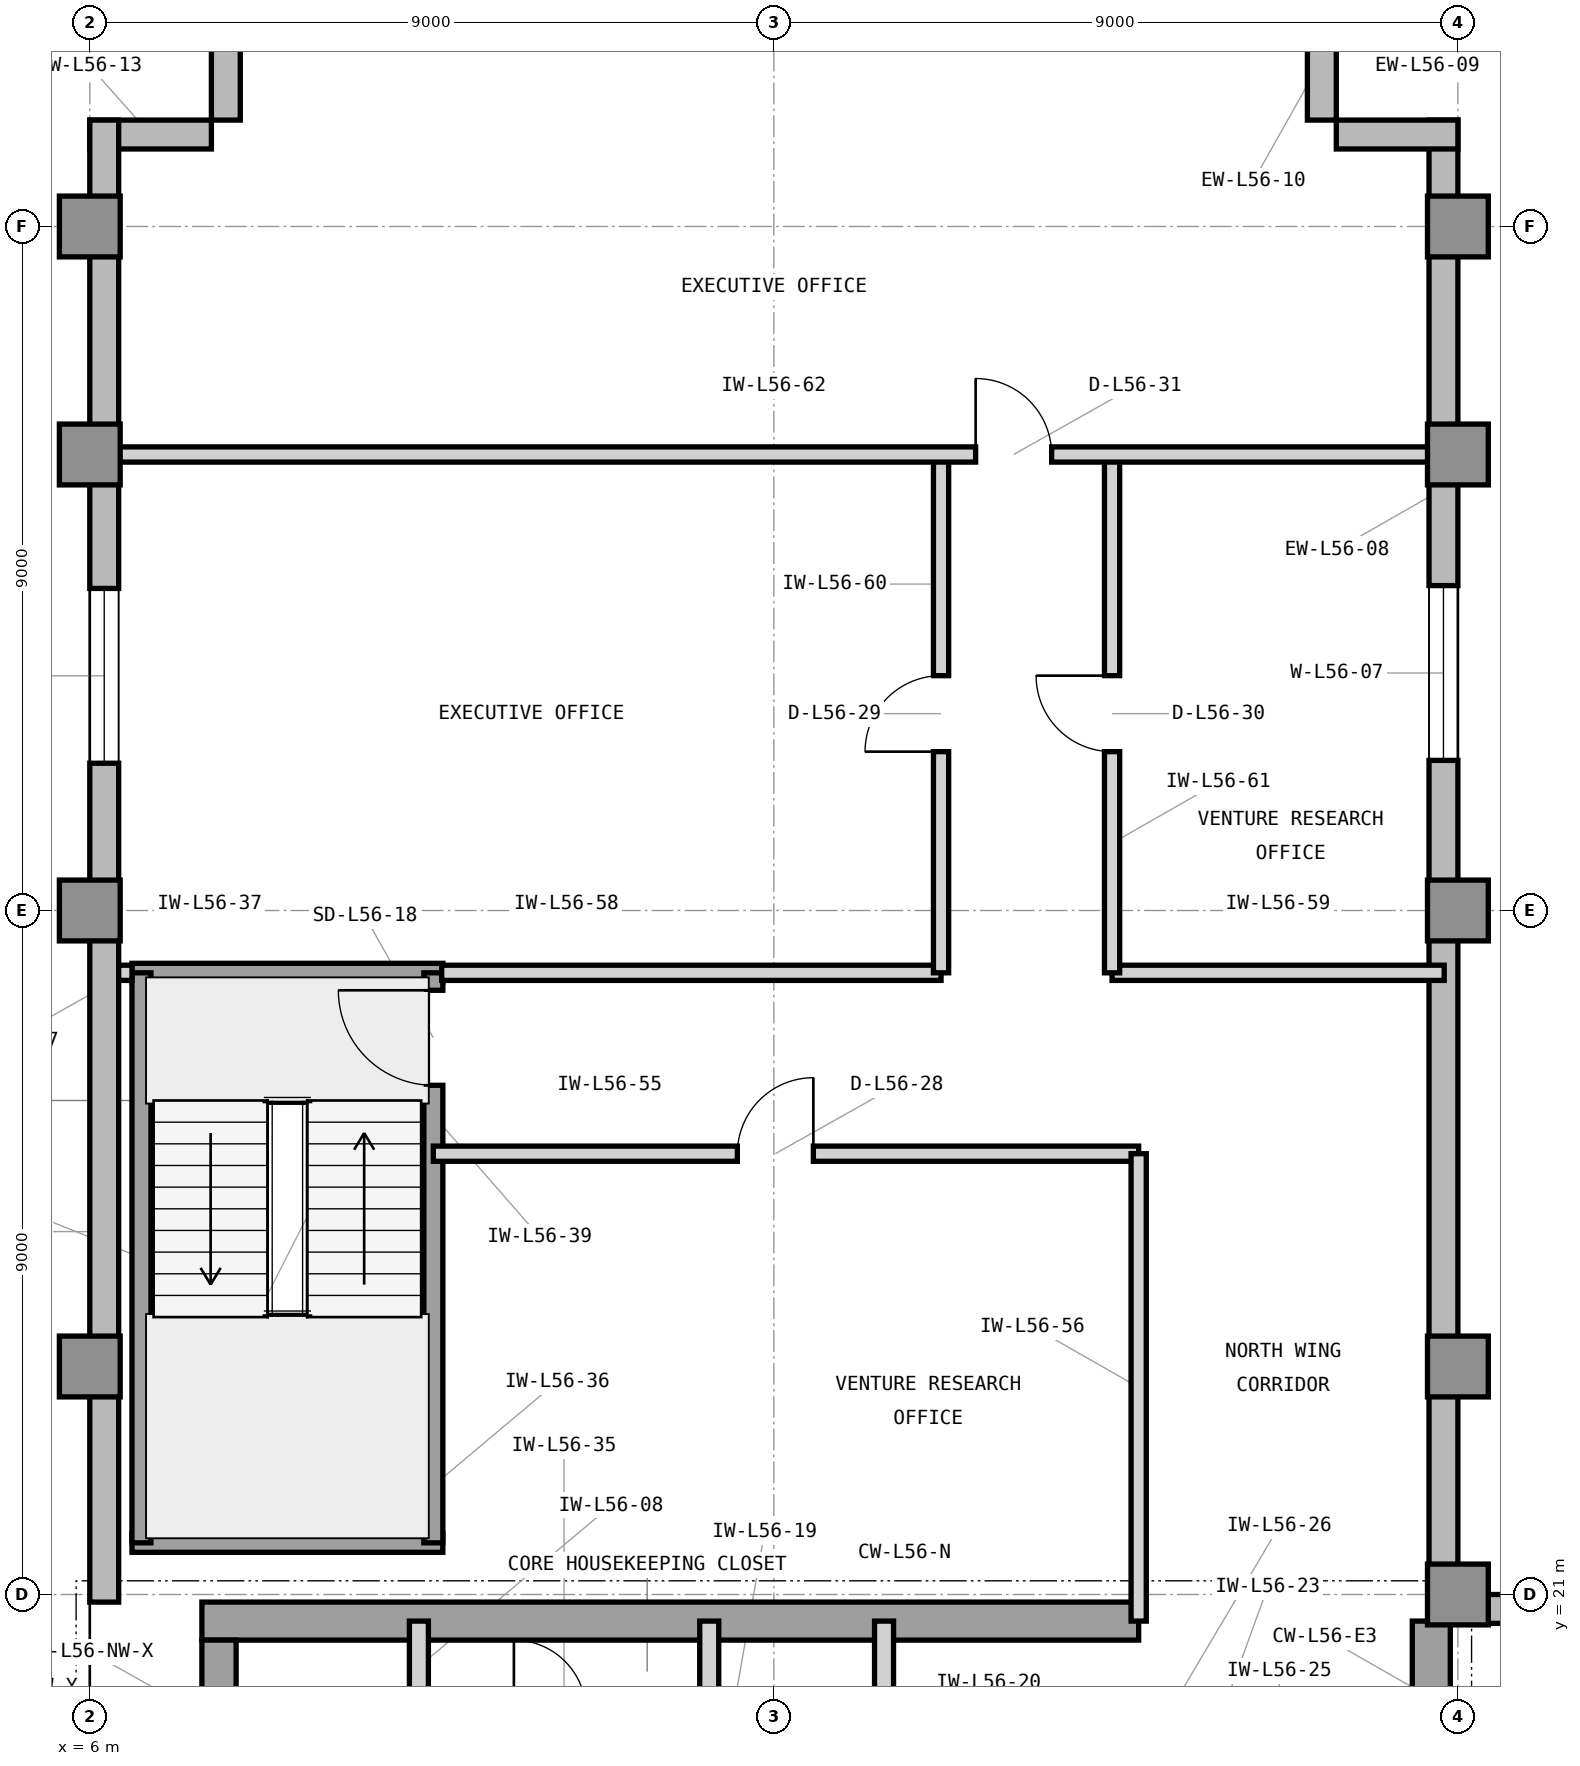
"""IFC4 building model, lengths in metres.
Left out: names, types, materials, properties, quantities, classifications, styles, units other than length and angle.
Written with IfcOpenShell. Run it as: python <this file> out.ifc"""

import sys

from ifc_helpers import new_model, si_unit, direction, frame, frame_2d, origin, origin_2d, place, context, subcontext, project, spatial, rectangle, extrude, element, fill, save


model = new_model("IFC4")
c1 = context("Model", 3, precision=1e-05, world=origin(), true_north=direction((0.0, 1.0)))
c2 = subcontext(c1, "Body", "Model", "MODEL_VIEW")
j1 = project(units=[si_unit("LENGTHUNIT", "METRE"), si_unit("PLANEANGLEUNIT", "RADIAN")], contexts=[c1])
p1 = place(None, origin())
s1 = spatial("IfcSite", under=j1, at=p1, CompositionType="ELEMENT")
p2 = place(p1, origin())
s2 = spatial("IfcBuilding", under=s1, at=p2, CompositionType="ELEMENT")
p3 = place(p2, frame((0.0, 0.0, 231.3)))
s3 = spatial("IfcBuildingStorey", under=s2, at=p3, CompositionType="ELEMENT", Elevation=231.3)
p4 = place(p3, frame((7.475, 20.65, 0.0), z_axis=(0.0, 0.0, 1.0), x_axis=(1.0, 0.0, 0.0)))
e1 = element("IfcWall", 1, at=p4, inside=s3, PredefinedType="SHEAR", context=c2, shape_type="SweptSolid", body=[
    extrude(rectangle(XDim=12.325, YDim=0.5, at=frame_2d((6.163, 0.0))), origin(), (0.0, 0.0, 1.0), 3.9),
])
p5 = place(p3, frame((23.65, 16.6, 0.0), z_axis=(0.0, 0.0, 1.0), x_axis=(0.0, 1.0, 0.0)))
e2 = element("IfcWall", 2, at=p5, inside=s3, PredefinedType="SHEAR", context=c2, shape_type="SweptSolid", body=[
    extrude(rectangle(XDim=4.05, YDim=0.5, at=frame_2d((2.025, 0.0))), origin(), (0.0, 0.0, 1.0), 3.9),
])
p6 = place(p3, frame((7.7, 19.575, 0.0), z_axis=(0.0, 0.0, 1.0), x_axis=(0.0, 1.0, 0.0)))
e3 = element("IfcWall", 3, at=p6, inside=s3, PredefinedType="SHEAR", context=c2, shape_type="SweptSolid", body=[
    extrude(rectangle(XDim=0.825, YDim=0.45, at=frame_2d((0.413, 0.0))), origin(), (0.0, 0.0, 1.0), 3.9),
])
for number, where, z_axis, x_axis in (
    (4, (24.0, 21.0, 0.0), (0.0, 0.0, 1.0), (1.0, 0.0, 0.0)),
    (5, (6.0, 24.0, 0.0), (0.0, 0.0, 1.0), (1.0, 0.0, 0.0)),
    (6, (24.0, 24.0, 0.0), (0.0, 0.0, 1.0), (1.0, 0.0, 0.0)),
    (7, (6.0, 30.0, 0.0), (0.0, 0.0, 1.0), (1.0, 0.0, 0.0)),
    (8, (24.0, 30.0, 0.0), (0.0, 0.0, 1.0), (1.0, 0.0, 0.0)),
    (9, (6.0, 36.0, 0.0), (0.0, 0.0, 1.0), (1.0, 0.0, 0.0)),
    (10, (24.0, 36.0, 0.0), (0.0, 0.0, 1.0), (1.0, 0.0, 0.0)),
    (11, (6.0, 39.0, 0.0), (0.0, 0.0, 1.0), (1.0, 0.0, 0.0)),
    (12, (24.0, 39.0, 0.0), (0.0, 0.0, 1.0), (1.0, 0.0, 0.0)),
):
    element("IfcColumn", number, at=place(p3, frame(where, z_axis=z_axis, x_axis=x_axis)), inside=s3, PredefinedType="COLUMN", context=c2, shape_type="SweptSolid", body=[
        extrude(rectangle(XDim=0.8, YDim=0.8, at=origin_2d()), origin(), (0.0, 0.0, 1.0), 3.9),
    ])
p7 = place(p3, frame((52.4, 20.81, 0.0), z_axis=(0.0, 0.0, 1.0), x_axis=(-1.0, 0.0, 0.0)))
e13 = element("IfcWall", 13, at=p7, inside=s3, PredefinedType="STANDARD", context=c2, shape_type="SweptSolid", body=[
    extrude(rectangle(XDim=28.4, YDim=0.38, at=frame_2d((14.2, 0.0))), origin(), (0.0, 0.0, 1.0), 3.7),
])
p8 = place(p7, frame((5.95, 0.0, 0.9)))
e14 = element("IfcOpeningElement", 14, at=p8, cuts=e13, PredefinedType="OPENING", context=c2, shape_type="SweptSolid", body=[
    extrude(rectangle(XDim=2.3, YDim=2.2, at=frame_2d((1.15, 1.1))), frame((0.0, 0.2, 0.0), z_axis=(0.0, -1.0, 0.0), x_axis=(1.0, 0.0, 0.0)), (0.0, 0.0, 1.0), 0.4),
])
p9 = place(p7, frame((15.417, 0.0, 0.9)))
e15 = element("IfcOpeningElement", 15, at=p9, cuts=e13, PredefinedType="OPENING", context=c2, shape_type="SweptSolid", body=[
    extrude(rectangle(XDim=2.3, YDim=2.2, at=frame_2d((1.15, 1.1))), frame((0.0, 0.2, 0.0), z_axis=(0.0, -1.0, 0.0), x_axis=(1.0, 0.0, 0.0)), (0.0, 0.0, 1.0), 0.4),
])
p10 = place(p7, frame((26.084, 0.0, 0.9)))
e16 = element("IfcOpeningElement", 16, at=p10, cuts=e13, PredefinedType="OPENING", context=c2, shape_type="SweptSolid", body=[
    extrude(rectangle(XDim=1.6, YDim=2.2, at=frame_2d((0.8, 1.1))), frame((0.0, 0.2, 0.0), z_axis=(0.0, -1.0, 0.0), x_axis=(1.0, 0.0, 0.0)), (0.0, 0.0, 1.0), 0.4),
])
p11 = place(p3, frame((23.81, 21.0, 0.0), z_axis=(0.0, 0.0, 1.0), x_axis=(0.0, 1.0, 0.0)))
e17 = element("IfcWall", 17, at=p11, inside=s3, PredefinedType="STANDARD", context=c2, shape_type="SweptSolid", body=[
    extrude(rectangle(XDim=19.4, YDim=0.38, at=frame_2d((9.7, 0.0))), origin(), (0.0, 0.0, 1.0), 3.7),
])
p12 = place(p11, frame((10.975, 0.0, 0.9)))
e18 = element("IfcOpeningElement", 18, at=p12, cuts=e17, PredefinedType="OPENING", context=c2, shape_type="SweptSolid", body=[
    extrude(rectangle(XDim=2.3, YDim=2.2, at=frame_2d((1.15, 1.1))), frame((0.0, 0.2, 0.0), z_axis=(0.0, -1.0, 0.0), x_axis=(1.0, 0.0, 0.0)), (0.0, 0.0, 1.0), 0.4),
])
for number, where, z_axis, x_axis in (
    (19, (24.0, 40.21, 0.0), (0.0, 0.0, 1.0), (-1.0, 0.0, 0.0)),
    (20, (22.21, 40.4, 0.0), (0.0, 0.0, 1.0), (0.0, 1.0, 0.0)),
    (21, (7.79, 42.0, 0.0), (0.0, 0.0, 1.0), (0.0, -1.0, 0.0)),
    (22, (7.6, 40.21, 0.0), (0.0, 0.0, 1.0), (-1.0, 0.0, 0.0)),
):
    element("IfcWall", number, at=place(p3, frame(where, z_axis=z_axis, x_axis=x_axis)), inside=s3, PredefinedType="STANDARD", context=c2, shape_type="SweptSolid", body=[
        extrude(rectangle(XDim=1.6, YDim=0.38, at=frame_2d((0.8, 0.0))), origin(), (0.0, 0.0, 1.0), 3.7),
    ])
p13 = place(p3, frame((6.19, 40.4, 0.0), z_axis=(0.0, 0.0, 1.0), x_axis=(0.0, -1.0, 0.0)))
e23 = element("IfcWall", 23, at=p13, inside=s3, PredefinedType="STANDARD", context=c2, shape_type="SweptSolid", body=[
    extrude(rectangle(XDim=19.5, YDim=0.38, at=frame_2d((9.75, 0.0))), origin(), (0.0, 0.0, 1.0), 3.7),
])
p14 = place(p13, frame((6.163, 0.0, 0.9)))
e24 = element("IfcOpeningElement", 24, at=p14, cuts=e23, PredefinedType="OPENING", context=c2, shape_type="SweptSolid", body=[
    extrude(rectangle(XDim=2.3, YDim=2.2, at=frame_2d((1.15, 1.1))), frame((0.0, 0.2, 0.0), z_axis=(0.0, -1.0, 0.0), x_axis=(1.0, 0.0, 0.0)), (0.0, 0.0, 1.0), 0.4),
])
p15 = place(p3, frame((10.33, 19.45, 0.0), z_axis=(0.0, 0.0, 1.0), x_axis=(0.0, 1.0, 0.0)))
e25 = element("IfcWall", 25, at=p15, inside=s3, PredefinedType="PARTITIONING", context=c2, shape_type="SweptSolid", body=[
    extrude(rectangle(XDim=1.2, YDim=0.25, at=frame_2d((0.6, 0.0))), origin(), (0.0, 0.0, 1.0), 3.69),
])
for number, where, z_axis, x_axis in (
    (26, (14.15, 16.7, 0.0), (0.0, 0.0, 1.0), (0.0, 1.0, 0.0)),
    (27, (16.45, 16.7, 0.0), (0.0, 0.0, 1.0), (0.0, 1.0, 0.0)),
):
    element("IfcWall", number, at=place(p3, frame(where, z_axis=z_axis, x_axis=x_axis)), inside=s3, PredefinedType="PARTITIONING", context=c2, shape_type="SweptSolid", body=[
        extrude(rectangle(XDim=3.95, YDim=0.25, at=frame_2d((1.975, 0.0))), origin(), (0.0, 0.0, 1.0), 3.69),
    ])
for number, where, z_axis, x_axis in (
    (28, (6.555, 21.68, 0.0), (0.0, 0.0, 1.0), (1.0, 0.0, 0.0)),
    (29, (6.555, 29.18, 0.0), (0.0, 0.0, 1.0), (1.0, 0.0, 0.0)),
):
    element("IfcWall", number, at=place(p3, frame(where, z_axis=z_axis, x_axis=x_axis)), inside=s3, PredefinedType="SHEAR", context=c2, shape_type="SweptSolid", body=[
        extrude(rectangle(XDim=4.09, YDim=0.25, at=frame_2d((2.045, 0.0))), origin(), (0.0, 0.0, 1.0), 3.9),
    ])
p16 = place(p3, frame((6.68, 21.68, 0.0), z_axis=(0.0, 0.0, 1.0), x_axis=(0.0, 1.0, 0.0)))
e30 = element("IfcWall", 30, at=p16, inside=s3, PredefinedType="SHEAR", context=c2, shape_type="SweptSolid", body=[
    extrude(rectangle(XDim=7.5, YDim=0.25, at=frame_2d((3.75, 0.0))), origin(), (0.0, 0.0, 1.0), 3.9),
])
p17 = place(p3, frame((10.52, 21.68, 0.0), z_axis=(0.0, 0.0, 1.0), x_axis=(0.0, 1.0, 0.0)))
e31 = element("IfcWall", 31, at=p17, inside=s3, PredefinedType="SHEAR", context=c2, shape_type="SweptSolid", body=[
    extrude(rectangle(XDim=7.5, YDim=0.25, at=frame_2d((3.75, 0.0))), origin(), (0.0, 0.0, 1.0), 3.9),
])
p18 = place(p17, frame((6.02, 0.0, 0.0)))
e32 = element("IfcOpeningElement", 32, at=p18, cuts=e31, PredefinedType="OPENING", context=c2, shape_type="SweptSolid", body=[
    extrude(rectangle(XDim=1.25, YDim=2.2, at=frame_2d((0.625, 1.1))), frame((0.0, 0.135, 0.0), z_axis=(0.0, -1.0, 0.0), x_axis=(1.0, 0.0, 0.0)), (0.0, 0.0, 1.0), 0.27),
])
p19 = place(p3, frame((10.52, 26.8, 0.0), z_axis=(0.0, 0.0, 1.0), x_axis=(1.0, 0.0, 0.0)))
e33 = element("IfcWall", 33, at=p19, inside=s3, PredefinedType="PARTITIONING", context=c2, shape_type="SweptSolid", body=[
    extrude(rectangle(XDim=9.28, YDim=0.2, at=frame_2d((4.64, 0.0))), origin(), (0.0, 0.0, 1.0), 3.69),
])
p20 = place(p19, frame((4.0, 0.0, 0.0)))
e34 = element("IfcOpeningElement", 34, at=p20, cuts=e33, PredefinedType="OPENING", context=c2, shape_type="SweptSolid", body=[
    extrude(rectangle(XDim=1.0, YDim=2.15, at=frame_2d((0.5, 1.075))), frame((0.0, 0.11, 0.0), z_axis=(0.0, -1.0, 0.0), x_axis=(1.0, 0.0, 0.0)), (0.0, 0.0, 1.0), 0.22),
])
p21 = place(p3, frame((19.8, 20.65, 0.0), z_axis=(0.0, 0.0, 1.0), x_axis=(0.0, 1.0, 0.0)))
e35 = element("IfcWall", 35, at=p21, inside=s3, PredefinedType="PARTITIONING", context=c2, shape_type="SweptSolid", body=[
    extrude(rectangle(XDim=6.15, YDim=0.2, at=frame_2d((3.075, 0.0))), origin(), (0.0, 0.0, 1.0), 3.69),
])
p22 = place(p3, frame((6.38, 29.18, 0.0), z_axis=(0.0, 0.0, 1.0), x_axis=(1.0, 0.0, 0.0)))
e36 = element("IfcWall", 36, at=p22, inside=s3, PredefinedType="PARTITIONING", context=c2, shape_type="SweptSolid", body=[
    extrude(rectangle(XDim=0.175, YDim=0.2, at=frame_2d((0.087, 0.0))), origin(), (0.0, 0.0, 1.0), 3.69),
])
p23 = place(p3, frame((10.63, 29.18, 0.0), z_axis=(0.0, 0.0, 1.0), x_axis=(1.0, 0.0, 0.0)))
e37 = element("IfcWall", 37, at=p23, inside=s3, PredefinedType="PARTITIONING", context=c2, shape_type="SweptSolid", body=[
    extrude(rectangle(XDim=6.57, YDim=0.2, at=frame_2d((3.285, 0.0))), origin(), (0.0, 0.0, 1.0), 3.69),
])
p24 = place(p3, frame((19.45, 29.18, 0.0), z_axis=(0.0, 0.0, 1.0), x_axis=(1.0, 0.0, 0.0)))
e38 = element("IfcWall", 38, at=p24, inside=s3, PredefinedType="PARTITIONING", context=c2, shape_type="SweptSolid", body=[
    extrude(rectangle(XDim=4.37, YDim=0.2, at=frame_2d((2.185, 0.0))), origin(), (0.0, 0.0, 1.0), 3.69),
])
p25 = place(p3, frame((17.2, 29.18, 0.0), z_axis=(0.0, 0.0, 1.0), x_axis=(0.0, 1.0, 0.0)))
e39 = element("IfcWall", 39, at=p25, inside=s3, PredefinedType="PARTITIONING", context=c2, shape_type="SweptSolid", body=[
    extrude(rectangle(XDim=6.82, YDim=0.2, at=frame_2d((3.41, 0.0))), origin(), (0.0, 0.0, 1.0), 3.69),
])
p26 = place(p25, frame((2.91, 0.0, 0.0)))
e40 = element("IfcOpeningElement", 40, at=p26, cuts=e39, PredefinedType="OPENING", context=c2, shape_type="SweptSolid", body=[
    extrude(rectangle(XDim=1.0, YDim=2.15, at=frame_2d((0.5, 1.075))), frame((0.0, 0.11, 0.0), z_axis=(0.0, -1.0, 0.0), x_axis=(1.0, 0.0, 0.0)), (0.0, 0.0, 1.0), 0.22),
])
p27 = place(p3, frame((19.45, 29.18, 0.0), z_axis=(0.0, 0.0, 1.0), x_axis=(0.0, 1.0, 0.0)))
e41 = element("IfcWall", 41, at=p27, inside=s3, PredefinedType="PARTITIONING", context=c2, shape_type="SweptSolid", body=[
    extrude(rectangle(XDim=6.82, YDim=0.2, at=frame_2d((3.41, 0.0))), origin(), (0.0, 0.0, 1.0), 3.69),
])
p28 = place(p27, frame((2.91, 0.0, 0.0)))
e42 = element("IfcOpeningElement", 42, at=p28, cuts=e41, PredefinedType="OPENING", context=c2, shape_type="SweptSolid", body=[
    extrude(rectangle(XDim=1.0, YDim=2.15, at=frame_2d((0.5, 1.075))), frame((0.0, 0.11, 0.0), z_axis=(0.0, -1.0, 0.0), x_axis=(1.0, 0.0, 0.0)), (0.0, 0.0, 1.0), 0.22),
])
p29 = place(p3, frame((6.18, 36.0, 0.0), z_axis=(0.0, 0.0, 1.0), x_axis=(1.0, 0.0, 0.0)))
e43 = element("IfcWall", 43, at=p29, inside=s3, PredefinedType="PARTITIONING", context=c2, shape_type="SweptSolid", body=[
    extrude(rectangle(XDim=17.64, YDim=0.2, at=frame_2d((8.82, 0.0))), origin(), (0.0, 0.0, 1.0), 3.073),
])
p30 = place(p29, frame((11.475, 0.0, 0.0)))
e44 = element("IfcOpeningElement", 44, at=p30, cuts=e43, PredefinedType="OPENING", context=c2, shape_type="SweptSolid", body=[
    extrude(rectangle(XDim=1.0, YDim=2.15, at=frame_2d((0.5, 1.075))), frame((0.0, 0.11, 0.0), z_axis=(0.0, -1.0, 0.0), x_axis=(1.0, 0.0, 0.0)), (0.0, 0.0, 1.0), 0.22),
])
p31 = place(p12, origin())
e45 = element("IfcWindow", 45, at=p31, inside=s3, PartitioningType="SINGLE_PANEL", PredefinedType="WINDOW", context=c2, shape_type="SweptSolid", body=[
    extrude(rectangle(XDim=2.3, YDim=2.2, at=frame_2d((1.15, 1.1))), frame((0.0, 0.11, 0.0), z_axis=(0.0, -1.0, 0.0), x_axis=(1.0, 0.0, 0.0)), (0.0, 0.0, 1.0), 0.06),
])
fill(e18, e45)
p32 = place(p14, origin())
e46 = element("IfcWindow", 46, at=p32, inside=s3, PartitioningType="SINGLE_PANEL", PredefinedType="WINDOW", context=c2, shape_type="SweptSolid", body=[
    extrude(rectangle(XDim=2.3, YDim=2.2, at=frame_2d((1.15, 1.1))), frame((0.0, 0.11, 0.0), z_axis=(0.0, -1.0, 0.0), x_axis=(1.0, 0.0, 0.0)), (0.0, 0.0, 1.0), 0.06),
])
fill(e24, e46)
p33 = place(p18, origin())
e47 = element("IfcDoor", 47, at=p33, inside=s3, OperationType="SINGLE_SWING_RIGHT", PredefinedType="DOOR", context=c2, shape_type="SweptSolid", body=[
    extrude(rectangle(XDim=1.25, YDim=2.2, at=frame_2d((0.625, 1.1))), frame((0.0, 0.025, 0.0), z_axis=(0.0, -1.0, 0.0), x_axis=(1.0, 0.0, 0.0)), (0.0, 0.0, 1.0), 0.05),
])
fill(e32, e47)
p34 = place(p20, origin())
e48 = element("IfcDoor", 48, at=p34, inside=s3, OperationType="SINGLE_SWING_RIGHT", PredefinedType="DOOR", context=c2, shape_type="SweptSolid", body=[
    extrude(rectangle(XDim=1.0, YDim=2.15, at=frame_2d((0.5, 1.075))), frame((0.0, 0.025, 0.0), z_axis=(0.0, -1.0, 0.0), x_axis=(1.0, 0.0, 0.0)), (0.0, 0.0, 1.0), 0.05),
])
fill(e34, e48)
p35 = place(p26, origin())
e49 = element("IfcDoor", 49, at=p35, inside=s3, OperationType="SINGLE_SWING_LEFT", PredefinedType="DOOR", context=c2, shape_type="SweptSolid", body=[
    extrude(rectangle(XDim=1.0, YDim=2.15, at=frame_2d((0.5, 1.075))), frame((0.0, 0.025, 0.0), z_axis=(0.0, -1.0, 0.0), x_axis=(1.0, 0.0, 0.0)), (0.0, 0.0, 1.0), 0.05),
])
fill(e40, e49)
p36 = place(p28, origin())
e50 = element("IfcDoor", 50, at=p36, inside=s3, OperationType="SINGLE_SWING_RIGHT", PredefinedType="DOOR", context=c2, shape_type="SweptSolid", body=[
    extrude(rectangle(XDim=1.0, YDim=2.15, at=frame_2d((0.5, 1.075))), frame((0.0, 0.025, 0.0), z_axis=(0.0, -1.0, 0.0), x_axis=(1.0, 0.0, 0.0)), (0.0, 0.0, 1.0), 0.05),
])
fill(e42, e50)
p37 = place(p30, origin())
e51 = element("IfcDoor", 51, at=p37, inside=s3, OperationType="SINGLE_SWING_LEFT", PredefinedType="DOOR", context=c2, shape_type="SweptSolid", body=[
    extrude(rectangle(XDim=1.0, YDim=2.15, at=frame_2d((0.5, 1.075))), frame((0.0, 0.025, 0.0), z_axis=(0.0, -1.0, 0.0), x_axis=(1.0, 0.0, 0.0)), (0.0, 0.0, 1.0), 0.05),
])
fill(e44, e51)
save(model, sys.argv[1])
